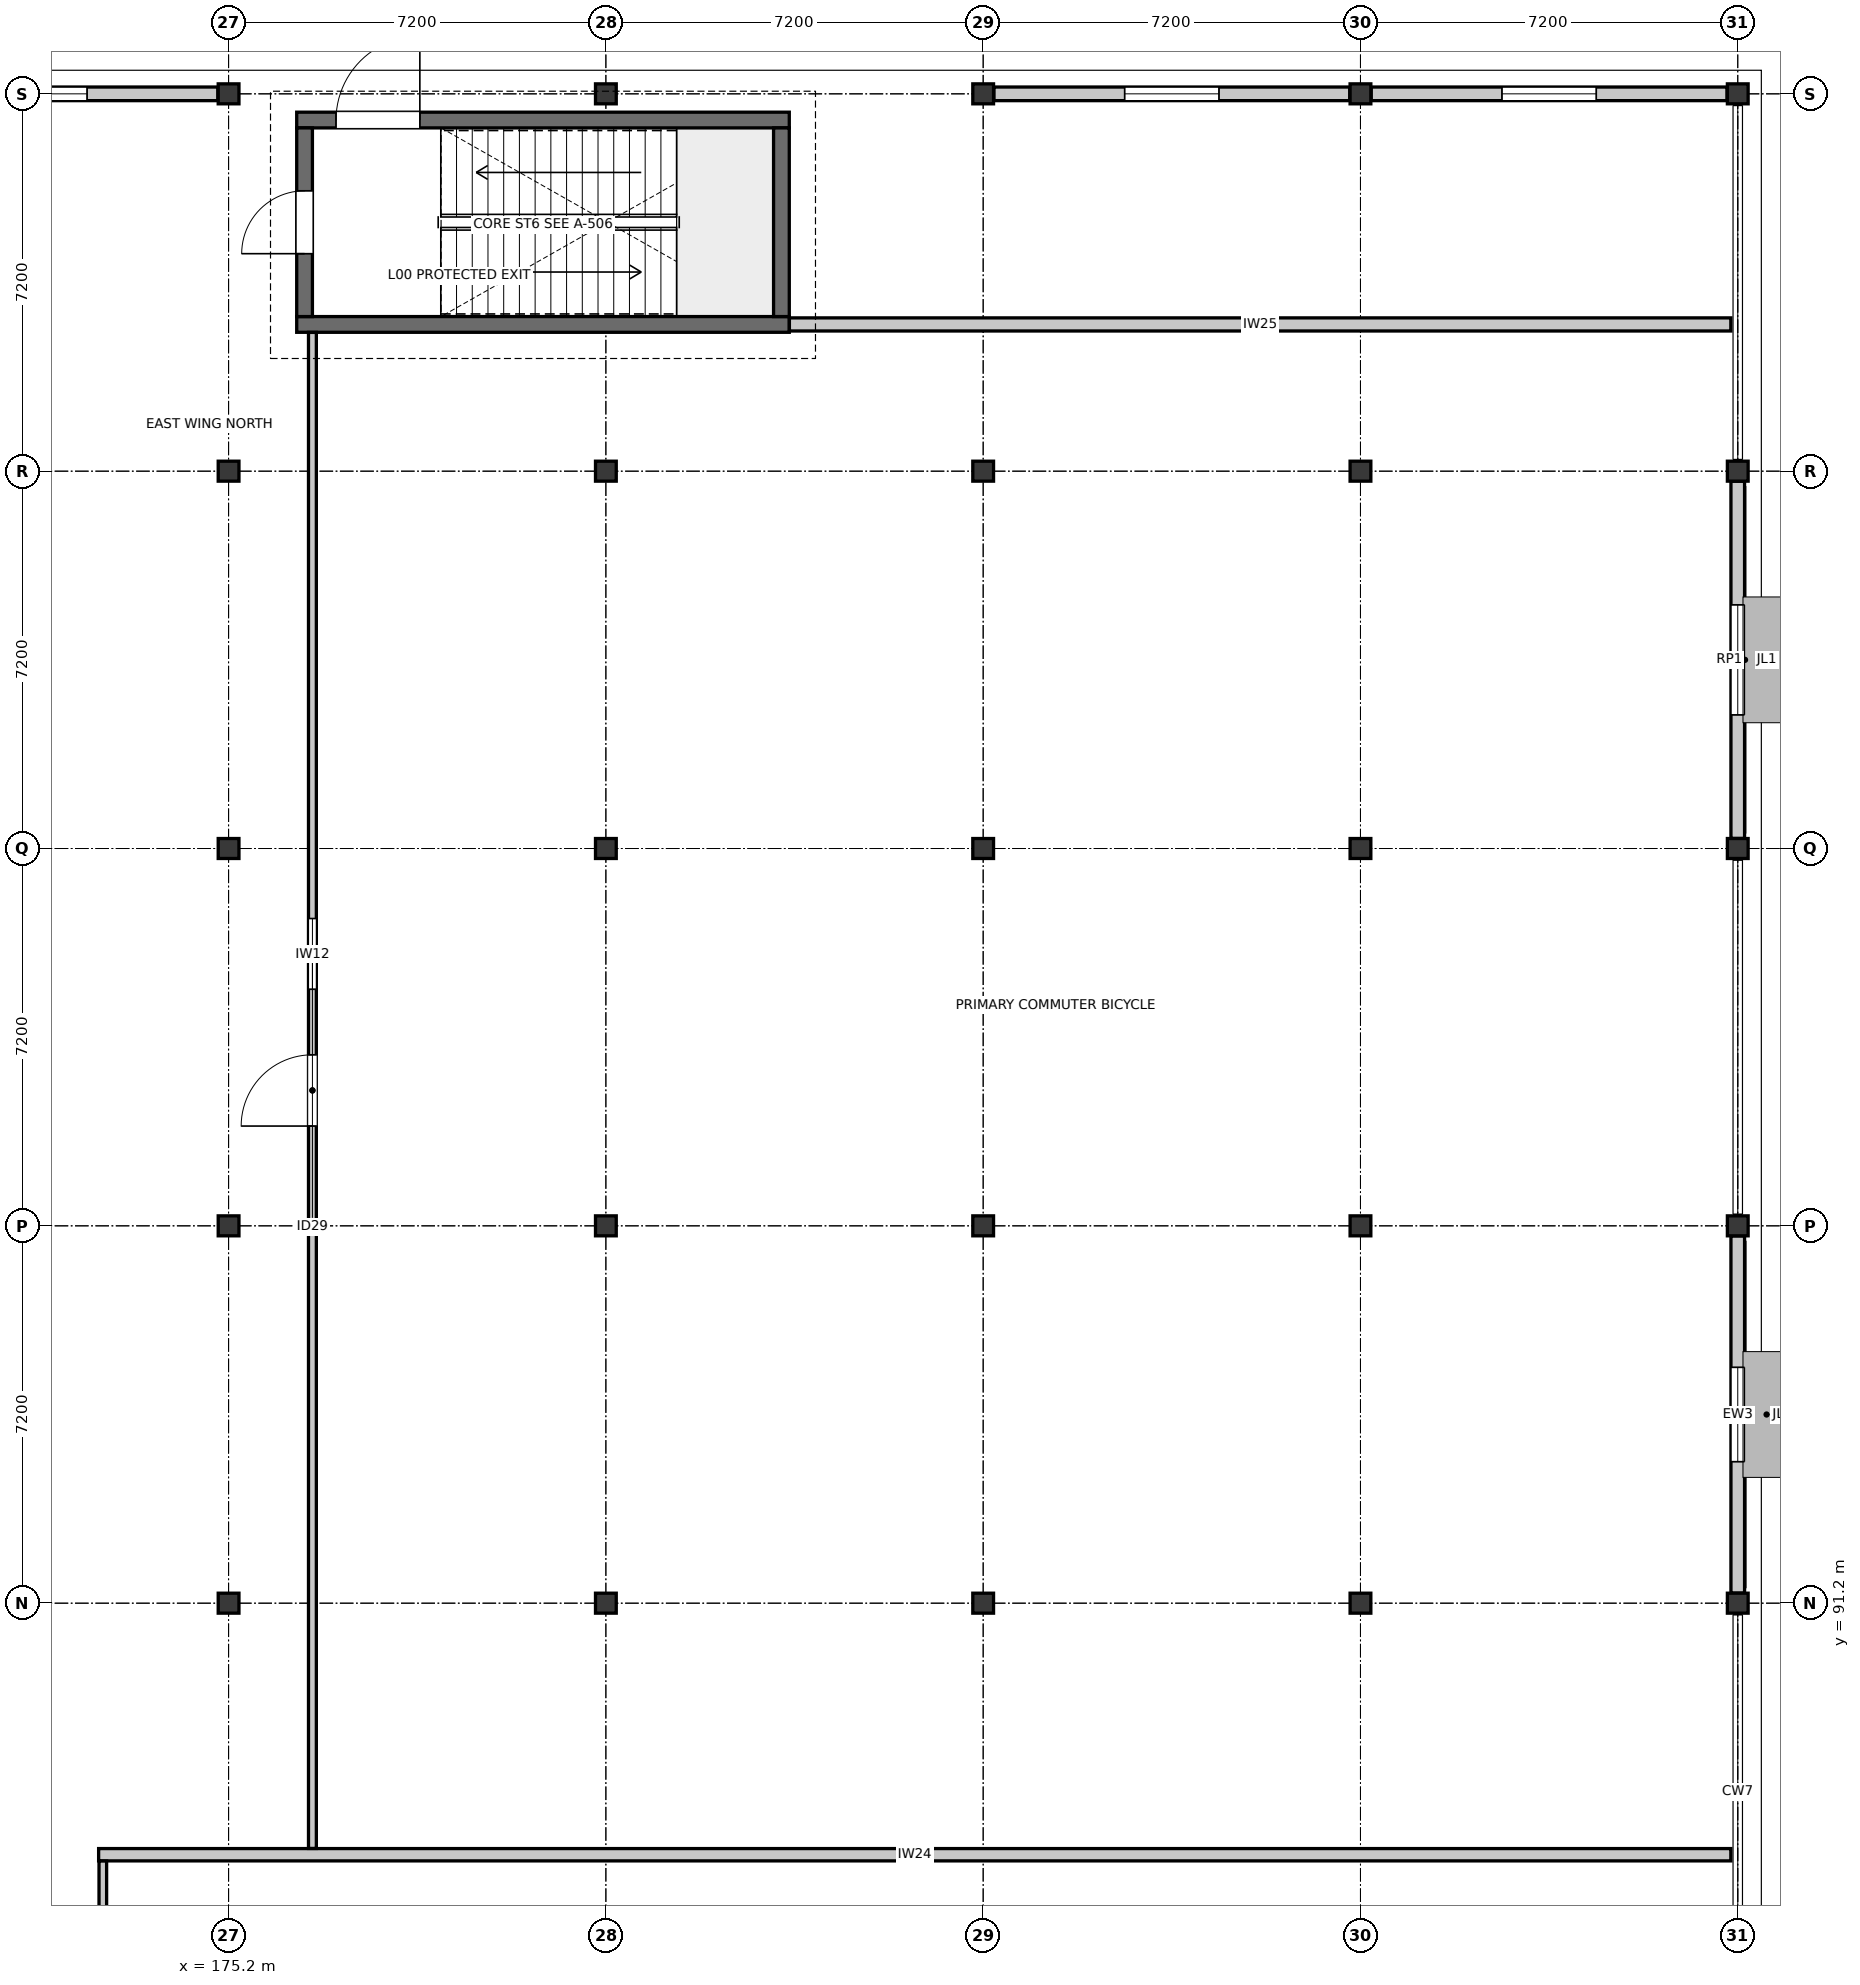
"""IFC4 building model, lengths in metres.
Left out: names, types, materials, properties, quantities, classifications, styles, units other than length and angle.
Written with IfcOpenShell. Run it as: python <this file> out.ifc"""

import sys

from ifc_helpers import new_model, si_unit, direction, frame, frame_2d, origin, origin_2d, place, context, subcontext, project, spatial, rectangle, i_section, extrude, element, fill, save


model = new_model("IFC4")
c1 = context("Model", 3, precision=1e-05, world=origin(), true_north=direction((0.0, 1.0)))
c2 = subcontext(c1, "Body", "Model", "MODEL_VIEW")
j1 = project(units=[si_unit("LENGTHUNIT", "METRE"), si_unit("PLANEANGLEUNIT", "RADIAN")], contexts=[c1])
p1 = place(None, origin())
s1 = spatial("IfcSite", under=j1, at=p1, CompositionType="ELEMENT")
p2 = place(p1, origin())
s2 = spatial("IfcBuilding", under=s1, at=p2, CompositionType="ELEMENT")
p3 = place(p2, origin())
s3 = spatial("IfcBuildingStorey", under=s2, at=p3, CompositionType="ELEMENT", Elevation=0.0)
for number, where, z_axis, x_axis in (
    (1, (175.2, 91.2, 0.0), (0.0, 0.0, 1.0), (1.0, 0.0, 0.0)),
    (2, (175.2, 98.4, 0.0), (0.0, 0.0, 1.0), (1.0, 0.0, 0.0)),
    (3, (175.2, 105.6, 0.0), (0.0, 0.0, 1.0), (1.0, 0.0, 0.0)),
    (4, (175.2, 112.8, 0.0), (0.0, 0.0, 1.0), (1.0, 0.0, 0.0)),
    (5, (175.2, 120.0, 0.0), (0.0, 0.0, 1.0), (1.0, 0.0, 0.0)),
    (6, (182.4, 91.2, 0.0), (0.0, 0.0, 1.0), (1.0, 0.0, 0.0)),
    (7, (182.4, 98.4, 0.0), (0.0, 0.0, 1.0), (1.0, 0.0, 0.0)),
    (8, (182.4, 105.6, 0.0), (0.0, 0.0, 1.0), (1.0, 0.0, 0.0)),
    (9, (182.4, 112.8, 0.0), (0.0, 0.0, 1.0), (1.0, 0.0, 0.0)),
    (10, (182.4, 120.0, 0.0), (0.0, 0.0, 1.0), (1.0, 0.0, 0.0)),
    (11, (189.6, 91.2, 0.0), (0.0, 0.0, 1.0), (1.0, 0.0, 0.0)),
    (12, (189.6, 98.4, 0.0), (0.0, 0.0, 1.0), (1.0, 0.0, 0.0)),
    (13, (189.6, 105.6, 0.0), (0.0, 0.0, 1.0), (1.0, 0.0, 0.0)),
    (14, (189.6, 112.8, 0.0), (0.0, 0.0, 1.0), (1.0, 0.0, 0.0)),
    (15, (189.6, 120.0, 0.0), (0.0, 0.0, 1.0), (1.0, 0.0, 0.0)),
    (16, (196.8, 91.2, 0.0), (0.0, 0.0, 1.0), (1.0, 0.0, 0.0)),
    (17, (196.8, 98.4, 0.0), (0.0, 0.0, 1.0), (1.0, 0.0, 0.0)),
    (18, (196.8, 105.6, 0.0), (0.0, 0.0, 1.0), (1.0, 0.0, 0.0)),
    (19, (196.8, 112.8, 0.0), (0.0, 0.0, 1.0), (1.0, 0.0, 0.0)),
    (20, (196.8, 120.0, 0.0), (0.0, 0.0, 1.0), (1.0, 0.0, 0.0)),
    (21, (204.0, 91.2, 0.0), (0.0, 0.0, 1.0), (1.0, 0.0, 0.0)),
    (22, (204.0, 98.4, 0.0), (0.0, 0.0, 1.0), (1.0, 0.0, 0.0)),
    (23, (204.0, 105.6, 0.0), (0.0, 0.0, 1.0), (1.0, 0.0, 0.0)),
    (24, (204.0, 112.8, 0.0), (0.0, 0.0, 1.0), (1.0, 0.0, 0.0)),
    (25, (204.0, 120.0, 0.0), (0.0, 0.0, 1.0), (1.0, 0.0, 0.0)),
):
    element("IfcColumn", number, at=place(p3, frame(where, z_axis=z_axis, x_axis=x_axis)), inside=s3, PredefinedType="COLUMN", context=c2, shape_type="SweptSolid", body=[
        extrude(i_section(OverallWidth=0.396, OverallDepth=0.381, WebThickness=0.019, FlangeThickness=0.03, FilletRadius=0.015, at=origin_2d()), origin(), (0.0, 0.0, 1.0), 5.4),
    ])
p4 = place(p3, frame((204.0, 98.208, 0.0), z_axis=(0.0, 0.0, 1.0), x_axis=(0.0, -1.0, 0.0)))
e26 = element("IfcWall", 26, at=p4, inside=s3, PredefinedType="STANDARD", context=c2, shape_type="SweptSolid", body=[
    extrude(rectangle(XDim=6.816, YDim=0.26, at=frame_2d((3.408, 0.0))), origin(), (0.0, 0.0, 1.0), 4.442),
])
p5 = place(p4, frame((2.508, 0.0, 0.9)))
e27 = element("IfcOpeningElement", 27, at=p5, cuts=e26, PredefinedType="OPENING", context=c2, shape_type="SweptSolid", body=[
    extrude(rectangle(XDim=1.8, YDim=1.5, at=frame_2d((0.9, 0.75))), frame((0.0, 0.14, 0.0), z_axis=(0.0, -1.0, 0.0), x_axis=(1.0, 0.0, 0.0)), (0.0, 0.0, 1.0), 0.28),
])
p6 = place(p3, frame((204.0, 112.608, 0.0), z_axis=(0.0, 0.0, 1.0), x_axis=(0.0, -1.0, 0.0)))
e28 = element("IfcWall", 28, at=p6, inside=s3, PredefinedType="STANDARD", context=c2, shape_type="SweptSolid", body=[
    extrude(rectangle(XDim=6.816, YDim=0.26, at=frame_2d((3.408, 0.0))), origin(), (0.0, 0.0, 1.0), 4.442),
])
p7 = place(p6, frame((2.358, 0.0, 0.9)))
e29 = element("IfcOpeningElement", 29, at=p7, cuts=e28, PredefinedType="OPENING", context=c2, shape_type="SweptSolid", body=[
    extrude(rectangle(XDim=2.1, YDim=1.5, at=frame_2d((1.05, 0.75))), frame((0.0, 0.14, 0.0), z_axis=(0.0, -1.0, 0.0), x_axis=(1.0, 0.0, 0.0)), (0.0, 0.0, 1.0), 0.28),
])
p8 = place(p3, frame((168.205, 120.0, 0.0), z_axis=(0.0, 0.0, 1.0), x_axis=(1.0, 0.0, 0.0)))
e30 = element("IfcWall", 30, at=p8, inside=s3, PredefinedType="STANDARD", context=c2, shape_type="SweptSolid", body=[
    extrude(rectangle(XDim=6.79, YDim=0.26, at=frame_2d((3.395, 0.0))), origin(), (0.0, 0.0, 1.0), 4.442),
])
p9 = place(p8, frame((2.495, 0.0, 0.9)))
e31 = element("IfcOpeningElement", 31, at=p9, cuts=e30, PredefinedType="OPENING", context=c2, shape_type="SweptSolid", body=[
    extrude(rectangle(XDim=1.8, YDim=1.5, at=frame_2d((0.9, 0.75))), frame((0.0, 0.14, 0.0), z_axis=(0.0, -1.0, 0.0), x_axis=(1.0, 0.0, 0.0)), (0.0, 0.0, 1.0), 0.28),
])
p10 = place(p3, frame((189.805, 120.0, 0.0), z_axis=(0.0, 0.0, 1.0), x_axis=(1.0, 0.0, 0.0)))
e32 = element("IfcWall", 32, at=p10, inside=s3, PredefinedType="STANDARD", context=c2, shape_type="SweptSolid", body=[
    extrude(rectangle(XDim=6.79, YDim=0.26, at=frame_2d((3.395, 0.0))), origin(), (0.0, 0.0, 1.0), 4.442),
])
p11 = place(p10, frame((2.495, 0.0, 0.9)))
e33 = element("IfcOpeningElement", 33, at=p11, cuts=e32, PredefinedType="OPENING", context=c2, shape_type="SweptSolid", body=[
    extrude(rectangle(XDim=1.8, YDim=1.5, at=frame_2d((0.9, 0.75))), frame((0.0, 0.14, 0.0), z_axis=(0.0, -1.0, 0.0), x_axis=(1.0, 0.0, 0.0)), (0.0, 0.0, 1.0), 0.28),
])
p12 = place(p3, frame((197.005, 120.0, 0.0), z_axis=(0.0, 0.0, 1.0), x_axis=(1.0, 0.0, 0.0)))
e34 = element("IfcWall", 34, at=p12, inside=s3, PredefinedType="STANDARD", context=c2, shape_type="SweptSolid", body=[
    extrude(rectangle(XDim=6.79, YDim=0.26, at=frame_2d((3.395, 0.0))), origin(), (0.0, 0.0, 1.0), 4.442),
])
p13 = place(p12, frame((2.495, 0.0, 0.9)))
e35 = element("IfcOpeningElement", 35, at=p13, cuts=e34, PredefinedType="OPENING", context=c2, shape_type="SweptSolid", body=[
    extrude(rectangle(XDim=1.8, YDim=1.5, at=frame_2d((0.9, 0.75))), frame((0.0, 0.14, 0.0), z_axis=(0.0, -1.0, 0.0), x_axis=(1.0, 0.0, 0.0)), (0.0, 0.0, 1.0), 0.28),
])
p14 = place(p3, frame((185.9, 115.6, 0.0), z_axis=(0.0, 0.0, 1.0), x_axis=(-1.0, 0.0, 0.0)))
e36 = element("IfcWall", 36, at=p14, inside=s3, PredefinedType="SOLIDWALL", context=c2, shape_type="SweptSolid", body=[
    extrude(rectangle(XDim=9.4, YDim=0.3, at=frame_2d((4.7, 0.0))), origin(), (0.0, 0.0, 1.0), 5.14),
])
p15 = place(p3, frame((176.5, 119.5, 0.0), z_axis=(0.0, 0.0, 1.0), x_axis=(1.0, 0.0, 0.0)))
e37 = element("IfcWall", 37, at=p15, inside=s3, PredefinedType="SOLIDWALL", context=c2, shape_type="SweptSolid", body=[
    extrude(rectangle(XDim=9.4, YDim=0.3, at=frame_2d((4.7, 0.0))), origin(), (0.0, 0.0, 1.0), 5.14),
])
p16 = place(p15, frame((0.75, 0.0, 0.0)))
e38 = element("IfcOpeningElement", 38, at=p16, cuts=e37, PredefinedType="OPENING", context=c2, shape_type="SweptSolid", body=[
    extrude(rectangle(XDim=1.6, YDim=2.15, at=frame_2d((0.8, 1.075))), frame((0.0, 0.16, 0.0), z_axis=(0.0, -1.0, 0.0), x_axis=(1.0, 0.0, 0.0)), (0.0, 0.0, 1.0), 0.32),
])
p17 = place(p3, frame((176.65, 115.75, 0.0), z_axis=(0.0, 0.0, 1.0), x_axis=(0.0, 1.0, 0.0)))
e39 = element("IfcWall", 39, at=p17, inside=s3, PredefinedType="SOLIDWALL", context=c2, shape_type="SweptSolid", body=[
    extrude(rectangle(XDim=3.6, YDim=0.3, at=frame_2d((1.8, 0.0))), origin(), (0.0, 0.0, 1.0), 5.14),
])
p18 = place(p17, frame((1.2, 0.0, 0.0)))
e40 = element("IfcOpeningElement", 40, at=p18, cuts=e39, PredefinedType="OPENING", context=c2, shape_type="SweptSolid", body=[
    extrude(rectangle(XDim=1.2, YDim=2.2, at=frame_2d((0.6, 1.1))), frame((0.0, 0.16, 0.0), z_axis=(0.0, -1.0, 0.0), x_axis=(1.0, 0.0, 0.0)), (0.0, 0.0, 1.0), 0.32),
])
p19 = place(p3, frame((185.75, 119.35, 0.0), z_axis=(0.0, 0.0, 1.0), x_axis=(0.0, -1.0, 0.0)))
e41 = element("IfcWall", 41, at=p19, inside=s3, PredefinedType="SOLIDWALL", context=c2, shape_type="SweptSolid", body=[
    extrude(rectangle(XDim=3.6, YDim=0.3, at=frame_2d((1.8, 0.0))), origin(), (0.0, 0.0, 1.0), 5.14),
])
p20 = place(p3, frame((172.72, 86.4, 0.0), z_axis=(0.0, 0.0, 1.0), x_axis=(1.0, 0.0, 0.0)))
e42 = element("IfcWall", 42, at=p20, inside=s3, PredefinedType="PARTITIONING", context=c2, shape_type="SweptSolid", body=[
    extrude(rectangle(XDim=31.148, YDim=0.235, at=frame_2d((15.574, 0.0))), origin(), (0.0, 0.0, 1.0), 4.437),
])
p21 = place(p3, frame((185.902, 115.6, 0.0), z_axis=(0.0, 0.0, 1.0), x_axis=(1.0, 0.0, 0.0)))
e43 = element("IfcWall", 43, at=p21, inside=s3, PredefinedType="PARTITIONING", context=c2, shape_type="SweptSolid", body=[
    extrude(rectangle(XDim=17.966, YDim=0.25, at=frame_2d((8.983, 0.0))), origin(), (0.0, 0.0, 1.0), 4.437),
])
p22 = place(p3, frame((172.8, 56.514, 0.0), z_axis=(0.0, 0.0, 1.0), x_axis=(0.0, 1.0, 0.0)))
e44 = element("IfcWall", 44, at=p22, inside=s3, PredefinedType="PARTITIONING", context=c2, shape_type="SweptSolid", body=[
    extrude(rectangle(XDim=29.766, YDim=0.145, at=frame_2d((14.883, 0.0))), origin(), (0.0, 0.0, 1.0), 4.437),
])
p23 = place(p22, frame((14.253, 0.0, 0.0)))
e45 = element("IfcOpeningElement", 45, at=p23, cuts=e44, PredefinedType="OPENING", context=c2, shape_type="SweptSolid", body=[
    extrude(rectangle(XDim=1.26, YDim=2.22, at=frame_2d((0.63, 1.11))), frame((0.0, 0.083, 0.0), z_axis=(0.0, -1.0, 0.0), x_axis=(1.0, 0.0, 0.0)), (0.0, 0.0, 1.0), 0.165),
])
p24 = place(p22, frame((16.763, 0.0, 0.95)))
e46 = element("IfcOpeningElement", 46, at=p24, cuts=e44, PredefinedType="OPENING", context=c2, shape_type="SweptSolid", body=[
    extrude(rectangle(XDim=1.1, YDim=1.3, at=frame_2d((0.55, 0.65))), frame((0.0, 0.083, 0.0), z_axis=(0.0, -1.0, 0.0), x_axis=(1.0, 0.0, 0.0)), (0.0, 0.0, 1.0), 0.165),
])
p25 = place(p3, frame((176.8, 86.52, 0.0), z_axis=(0.0, 0.0, 1.0), x_axis=(0.0, 1.0, 0.0)))
e47 = element("IfcWall", 47, at=p25, inside=s3, PredefinedType="PARTITIONING", context=c2, shape_type="SweptSolid", body=[
    extrude(rectangle(XDim=28.928, YDim=0.15, at=frame_2d((14.464, 0.0))), origin(), (0.0, 0.0, 1.0), 4.437),
])
p26 = place(p25, frame((13.784, 0.0, 0.0)))
e48 = element("IfcOpeningElement", 48, at=p26, cuts=e47, PredefinedType="OPENING", context=c2, shape_type="SweptSolid", body=[
    extrude(rectangle(XDim=1.36, YDim=2.22, at=frame_2d((0.68, 1.11))), frame((0.0, 0.085, 0.0), z_axis=(0.0, -1.0, 0.0), x_axis=(1.0, 0.0, 0.0)), (0.0, 0.0, 1.0), 0.17),
])
p27 = place(p25, frame((16.394, 0.0, 0.95)))
e49 = element("IfcOpeningElement", 49, at=p27, cuts=e47, PredefinedType="OPENING", context=c2, shape_type="SweptSolid", body=[
    extrude(rectangle(XDim=1.35, YDim=1.3, at=frame_2d((0.675, 0.65))), frame((0.0, 0.085, 0.0), z_axis=(0.0, -1.0, 0.0), x_axis=(1.0, 0.0, 0.0)), (0.0, 0.0, 1.0), 0.17),
])
p28 = place(p5, origin())
e50 = element("IfcWindow", 50, at=p28, inside=s3, PartitioningType="SINGLE_PANEL", PredefinedType="WINDOW", context=c2, shape_type="SweptSolid", body=[
    extrude(rectangle(XDim=1.8, YDim=1.5, at=frame_2d((0.9, 0.75))), frame((0.0, 0.03, 0.0), z_axis=(0.0, -1.0, 0.0), x_axis=(1.0, 0.0, 0.0)), (0.0, 0.0, 1.0), 0.06),
])
fill(e27, e50)
p29 = place(p7, origin())
e51 = element("IfcWindow", 51, at=p29, inside=s3, PartitioningType="SINGLE_PANEL", PredefinedType="WINDOW", context=c2, shape_type="SweptSolid", body=[
    extrude(rectangle(XDim=2.1, YDim=1.5, at=frame_2d((1.05, 0.75))), frame((0.0, 0.03, 0.0), z_axis=(0.0, -1.0, 0.0), x_axis=(1.0, 0.0, 0.0)), (0.0, 0.0, 1.0), 0.06),
])
fill(e29, e51)
p30 = place(p9, origin())
e52 = element("IfcWindow", 52, at=p30, inside=s3, PartitioningType="SINGLE_PANEL", PredefinedType="WINDOW", context=c2, shape_type="SweptSolid", body=[
    extrude(rectangle(XDim=1.8, YDim=1.5, at=frame_2d((0.9, 0.75))), frame((0.0, 0.03, 0.0), z_axis=(0.0, -1.0, 0.0), x_axis=(1.0, 0.0, 0.0)), (0.0, 0.0, 1.0), 0.06),
])
fill(e31, e52)
p31 = place(p11, origin())
e53 = element("IfcWindow", 53, at=p31, inside=s3, PartitioningType="SINGLE_PANEL", PredefinedType="WINDOW", context=c2, shape_type="SweptSolid", body=[
    extrude(rectangle(XDim=1.8, YDim=1.5, at=frame_2d((0.9, 0.75))), frame((0.0, 0.03, 0.0), z_axis=(0.0, -1.0, 0.0), x_axis=(1.0, 0.0, 0.0)), (0.0, 0.0, 1.0), 0.06),
])
fill(e33, e53)
p32 = place(p13, origin())
e54 = element("IfcWindow", 54, at=p32, inside=s3, PartitioningType="SINGLE_PANEL", PredefinedType="WINDOW", context=c2, shape_type="SweptSolid", body=[
    extrude(rectangle(XDim=1.8, YDim=1.5, at=frame_2d((0.9, 0.75))), frame((0.0, 0.03, 0.0), z_axis=(0.0, -1.0, 0.0), x_axis=(1.0, 0.0, 0.0)), (0.0, 0.0, 1.0), 0.06),
])
fill(e35, e54)
p33 = place(p16, origin())
e55 = element("IfcDoor", 55, at=p33, inside=s3, OperationType="SINGLE_SWING_RIGHT", PredefinedType="DOOR", context=c2, shape_type="SweptSolid", body=[
    extrude(rectangle(XDim=1.6, YDim=2.15, at=frame_2d((0.8, 1.075))), frame((0.0, 0.025, 0.0), z_axis=(0.0, -1.0, 0.0), x_axis=(1.0, 0.0, 0.0)), (0.0, 0.0, 1.0), 0.05),
])
fill(e38, e55)
p34 = place(p18, origin())
e56 = element("IfcDoor", 56, at=p34, inside=s3, OperationType="SINGLE_SWING_LEFT", PredefinedType="DOOR", context=c2, shape_type="SweptSolid", body=[
    extrude(rectangle(XDim=1.2, YDim=2.2, at=frame_2d((0.6, 1.1))), frame((0.0, 0.025, 0.0), z_axis=(0.0, -1.0, 0.0), x_axis=(1.0, 0.0, 0.0)), (0.0, 0.0, 1.0), 0.05),
])
fill(e40, e56)
p35 = place(p26, origin())
e57 = element("IfcDoor", 57, at=p35, inside=s3, OperationType="SINGLE_SWING_LEFT", PredefinedType="DOOR", context=c2, shape_type="SweptSolid", body=[
    extrude(rectangle(XDim=1.36, YDim=2.22, at=frame_2d((0.68, 1.11))), frame((0.0, 0.025, 0.0), z_axis=(0.0, -1.0, 0.0), x_axis=(1.0, 0.0, 0.0)), (0.0, 0.0, 1.0), 0.05),
])
fill(e48, e57)
p36 = place(p27, origin())
e58 = element("IfcWindow", 58, at=p36, inside=s3, PartitioningType="SINGLE_PANEL", PredefinedType="WINDOW", context=c2, shape_type="SweptSolid", body=[
    extrude(rectangle(XDim=1.35, YDim=1.3, at=frame_2d((0.675, 0.65))), frame((0.0, 0.03, 0.0), z_axis=(0.0, -1.0, 0.0), x_axis=(1.0, 0.0, 0.0)), (0.0, 0.0, 1.0), 0.06),
])
fill(e49, e58)
save(model, sys.argv[1])
